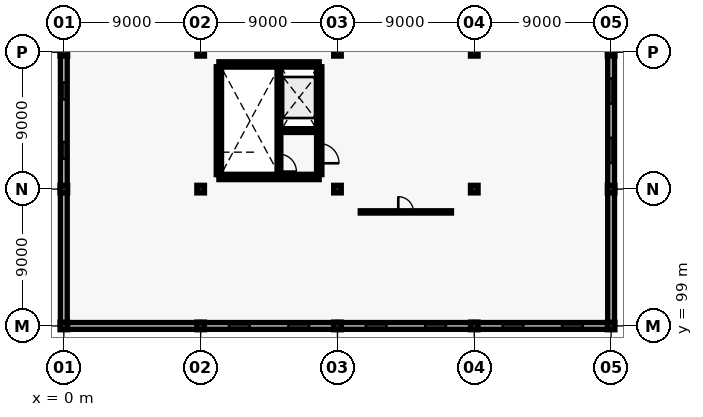
"""IFC4 building model, lengths in metres.
Left out: names, types, materials, properties, quantities, classifications, styles, units other than length and angle.
Written with IfcOpenShell. Run it as: python <this file> out.ifc"""

import sys

from ifc_helpers import new_model, si_unit, direction, frame, frame_2d, origin, origin_2d, place, context, subcontext, project, spatial, rectangle, extrude, element, fill, save


model = new_model("IFC4")
c1 = context("Model", 3, precision=1e-05, world=origin(), true_north=direction((0.0, 1.0)))
c2 = subcontext(c1, "Body", "Model", "MODEL_VIEW")
j1 = project(units=[si_unit("LENGTHUNIT", "METRE"), si_unit("PLANEANGLEUNIT", "RADIAN")], contexts=[c1])
p1 = place(None, origin())
s1 = spatial("IfcSite", under=j1, at=p1, CompositionType="ELEMENT")
p2 = place(p1, origin())
s2 = spatial("IfcBuilding", under=s1, at=p2, CompositionType="ELEMENT")
p3 = place(p2, frame((0.0, 0.0, 9.6)))
s3 = spatial("IfcBuildingStorey", under=s2, at=p3, CompositionType="ELEMENT", Elevation=9.6)
for number, where, z_axis, x_axis in (
    (1, (0.0, 99.0, 0.0), (0.0, 0.0, 1.0), (1.0, 0.0, 0.0)),
    (2, (0.0, 108.0, 0.0), (0.0, 0.0, 1.0), (1.0, 0.0, 0.0)),
    (3, (0.0, 117.0, 0.0), (0.0, 0.0, 1.0), (1.0, 0.0, 0.0)),
    (4, (9.0, 99.0, 0.0), (0.0, 0.0, 1.0), (1.0, 0.0, 0.0)),
    (5, (9.0, 108.0, 0.0), (0.0, 0.0, 1.0), (1.0, 0.0, 0.0)),
    (6, (9.0, 117.0, 0.0), (0.0, 0.0, 1.0), (1.0, 0.0, 0.0)),
    (7, (18.0, 99.0, 0.0), (0.0, 0.0, 1.0), (1.0, 0.0, 0.0)),
    (8, (18.0, 108.0, 0.0), (0.0, 0.0, 1.0), (1.0, 0.0, 0.0)),
    (9, (18.0, 117.0, 0.0), (0.0, 0.0, 1.0), (1.0, 0.0, 0.0)),
    (10, (27.0, 99.0, 0.0), (0.0, 0.0, 1.0), (1.0, 0.0, 0.0)),
    (11, (27.0, 108.0, 0.0), (0.0, 0.0, 1.0), (1.0, 0.0, 0.0)),
    (12, (27.0, 117.0, 0.0), (0.0, 0.0, 1.0), (1.0, 0.0, 0.0)),
    (13, (36.0, 99.0, 0.0), (0.0, 0.0, 1.0), (1.0, 0.0, 0.0)),
    (14, (36.0, 108.0, 0.0), (0.0, 0.0, 1.0), (1.0, 0.0, 0.0)),
    (15, (36.0, 117.0, 0.0), (0.0, 0.0, 1.0), (1.0, 0.0, 0.0)),
):
    element("IfcColumn", number, at=place(p3, frame(where, z_axis=z_axis, x_axis=x_axis)), inside=s3, PredefinedType="COLUMN", context=c2, shape_type="SweptSolid", body=[
        extrude(rectangle(XDim=0.5, YDim=0.5, at=origin_2d()), origin(), (0.0, 0.0, 1.0), 3.9),
    ])
p4 = place(p3, frame((0.0, 99.06, 0.0), z_axis=(0.0, 0.0, 1.0), x_axis=(0.0, 1.0, 0.0)))
e16 = element("IfcWall", 16, at=p4, inside=s3, PredefinedType="SOLIDWALL", context=c2, shape_type="SweptSolid", body=[
    extrude(rectangle(XDim=8.88, YDim=0.45, at=frame_2d((4.44, 0.0))), origin(), (0.0, 0.0, 1.0), 3.15),
])
p5 = place(p3, frame((0.0, 108.06, 0.0), z_axis=(0.0, 0.0, 1.0), x_axis=(0.0, 1.0, 0.0)))
e17 = element("IfcWall", 17, at=p5, inside=s3, PredefinedType="SOLIDWALL", context=c2, shape_type="SweptSolid", body=[
    extrude(rectangle(XDim=8.88, YDim=0.45, at=frame_2d((4.44, 0.0))), origin(), (0.0, 0.0, 1.0), 3.15),
])
p6 = place(p5, frame((1.936, 0.0, 0.9)))
e18 = element("IfcOpeningElement", 18, at=p6, cuts=e17, PredefinedType="OPENING", context=c2, shape_type="SweptSolid", body=[
    extrude(rectangle(XDim=1.1, YDim=1.65, at=frame_2d((0.55, 0.825))), frame((0.0, 0.235, 0.0), z_axis=(0.0, -1.0, 0.0), x_axis=(1.0, 0.0, 0.0)), (0.0, 0.0, 1.0), 0.47),
])
p7 = place(p5, frame((5.844, 0.0, 0.9)))
e19 = element("IfcOpeningElement", 19, at=p7, cuts=e17, PredefinedType="OPENING", context=c2, shape_type="SweptSolid", body=[
    extrude(rectangle(XDim=1.1, YDim=1.65, at=frame_2d((0.55, 0.825))), frame((0.0, 0.235, 0.0), z_axis=(0.0, -1.0, 0.0), x_axis=(1.0, 0.0, 0.0)), (0.0, 0.0, 1.0), 0.47),
])
p8 = place(p3, frame((0.06, 99.0, 0.0), z_axis=(0.0, 0.0, 1.0), x_axis=(1.0, 0.0, 0.0)))
e20 = element("IfcWall", 20, at=p8, inside=s3, PredefinedType="SOLIDWALL", context=c2, shape_type="SweptSolid", body=[
    extrude(rectangle(XDim=8.88, YDim=0.45, at=frame_2d((4.44, 0.0))), origin(), (0.0, 0.0, 1.0), 3.15),
])
p9 = place(p3, frame((9.06, 99.0, 0.0), z_axis=(0.0, 0.0, 1.0), x_axis=(1.0, 0.0, 0.0)))
e21 = element("IfcWall", 21, at=p9, inside=s3, PredefinedType="SOLIDWALL", context=c2, shape_type="SweptSolid", body=[
    extrude(rectangle(XDim=8.88, YDim=0.45, at=frame_2d((4.44, 0.0))), origin(), (0.0, 0.0, 1.0), 3.15),
])
p10 = place(p9, frame((1.811, 0.0, 0.9)))
e22 = element("IfcOpeningElement", 22, at=p10, cuts=e21, PredefinedType="OPENING", context=c2, shape_type="SweptSolid", body=[
    extrude(rectangle(XDim=1.35, YDim=1.5, at=frame_2d((0.675, 0.75))), frame((0.0, 0.235, 0.0), z_axis=(0.0, -1.0, 0.0), x_axis=(1.0, 0.0, 0.0)), (0.0, 0.0, 1.0), 0.47),
])
p11 = place(p9, frame((5.719, 0.0, 0.9)))
e23 = element("IfcOpeningElement", 23, at=p11, cuts=e21, PredefinedType="OPENING", context=c2, shape_type="SweptSolid", body=[
    extrude(rectangle(XDim=1.35, YDim=1.5, at=frame_2d((0.675, 0.75))), frame((0.0, 0.235, 0.0), z_axis=(0.0, -1.0, 0.0), x_axis=(1.0, 0.0, 0.0)), (0.0, 0.0, 1.0), 0.47),
])
p12 = place(p3, frame((18.06, 99.0, 0.0), z_axis=(0.0, 0.0, 1.0), x_axis=(1.0, 0.0, 0.0)))
e24 = element("IfcWall", 24, at=p12, inside=s3, PredefinedType="SOLIDWALL", context=c2, shape_type="SweptSolid", body=[
    extrude(rectangle(XDim=8.88, YDim=0.45, at=frame_2d((4.44, 0.0))), origin(), (0.0, 0.0, 1.0), 3.15),
])
p13 = place(p12, frame((1.811, 0.0, 0.9)))
e25 = element("IfcOpeningElement", 25, at=p13, cuts=e24, PredefinedType="OPENING", context=c2, shape_type="SweptSolid", body=[
    extrude(rectangle(XDim=1.35, YDim=1.5, at=frame_2d((0.675, 0.75))), frame((0.0, 0.235, 0.0), z_axis=(0.0, -1.0, 0.0), x_axis=(1.0, 0.0, 0.0)), (0.0, 0.0, 1.0), 0.47),
])
p14 = place(p12, frame((5.719, 0.0, 0.9)))
e26 = element("IfcOpeningElement", 26, at=p14, cuts=e24, PredefinedType="OPENING", context=c2, shape_type="SweptSolid", body=[
    extrude(rectangle(XDim=1.35, YDim=1.5, at=frame_2d((0.675, 0.75))), frame((0.0, 0.235, 0.0), z_axis=(0.0, -1.0, 0.0), x_axis=(1.0, 0.0, 0.0)), (0.0, 0.0, 1.0), 0.47),
])
p15 = place(p3, frame((27.06, 99.0, 0.0), z_axis=(0.0, 0.0, 1.0), x_axis=(1.0, 0.0, 0.0)))
e27 = element("IfcWall", 27, at=p15, inside=s3, PredefinedType="SOLIDWALL", context=c2, shape_type="SweptSolid", body=[
    extrude(rectangle(XDim=8.88, YDim=0.45, at=frame_2d((4.44, 0.0))), origin(), (0.0, 0.0, 1.0), 3.15),
])
p16 = place(p15, frame((1.811, 0.0, 0.9)))
e28 = element("IfcOpeningElement", 28, at=p16, cuts=e27, PredefinedType="OPENING", context=c2, shape_type="SweptSolid", body=[
    extrude(rectangle(XDim=1.35, YDim=1.5, at=frame_2d((0.675, 0.75))), frame((0.0, 0.235, 0.0), z_axis=(0.0, -1.0, 0.0), x_axis=(1.0, 0.0, 0.0)), (0.0, 0.0, 1.0), 0.47),
])
p17 = place(p15, frame((5.719, 0.0, 0.9)))
e29 = element("IfcOpeningElement", 29, at=p17, cuts=e27, PredefinedType="OPENING", context=c2, shape_type="SweptSolid", body=[
    extrude(rectangle(XDim=1.35, YDim=1.5, at=frame_2d((0.675, 0.75))), frame((0.0, 0.235, 0.0), z_axis=(0.0, -1.0, 0.0), x_axis=(1.0, 0.0, 0.0)), (0.0, 0.0, 1.0), 0.47),
])
p18 = place(p3, frame((36.0, 99.06, 0.0), z_axis=(0.0, 0.0, 1.0), x_axis=(0.0, 1.0, 0.0)))
e30 = element("IfcWall", 30, at=p18, inside=s3, PredefinedType="SOLIDWALL", context=c2, shape_type="SweptSolid", body=[
    extrude(rectangle(XDim=8.88, YDim=0.45, at=frame_2d((4.44, 0.0))), origin(), (0.0, 0.0, 1.0), 3.15),
])
p19 = place(p3, frame((36.0, 108.06, 0.0), z_axis=(0.0, 0.0, 1.0), x_axis=(0.0, 1.0, 0.0)))
e31 = element("IfcWall", 31, at=p19, inside=s3, PredefinedType="SOLIDWALL", context=c2, shape_type="SweptSolid", body=[
    extrude(rectangle(XDim=8.88, YDim=0.45, at=frame_2d((4.44, 0.0))), origin(), (0.0, 0.0, 1.0), 3.15),
])
p20 = place(p19, frame((1.661, 0.0, 0.9)))
e32 = element("IfcOpeningElement", 32, at=p20, cuts=e31, PredefinedType="OPENING", context=c2, shape_type="SweptSolid", body=[
    extrude(rectangle(XDim=1.65, YDim=1.5, at=frame_2d((0.825, 0.75))), frame((0.0, 0.235, 0.0), z_axis=(0.0, -1.0, 0.0), x_axis=(1.0, 0.0, 0.0)), (0.0, 0.0, 1.0), 0.47),
])
p21 = place(p19, frame((5.569, 0.0, 0.9)))
e33 = element("IfcOpeningElement", 33, at=p21, cuts=e31, PredefinedType="OPENING", context=c2, shape_type="SweptSolid", body=[
    extrude(rectangle(XDim=1.65, YDim=1.5, at=frame_2d((0.825, 0.75))), frame((0.0, 0.235, 0.0), z_axis=(0.0, -1.0, 0.0), x_axis=(1.0, 0.0, 0.0)), (0.0, 0.0, 1.0), 0.47),
])
for number, where, z_axis, x_axis in (
    (34, (10.2, 108.8, 0.0), (0.0, 0.0, 1.0), (1.0, 0.0, 0.0)),
    (35, (10.2, 116.2, 0.0), (0.0, 0.0, 1.0), (1.0, 0.0, 0.0)),
):
    element("IfcWall", number, at=place(p3, frame(where, z_axis=z_axis, x_axis=x_axis)), inside=s3, PredefinedType="SHEAR", context=c2, shape_type="SweptSolid", body=[
        extrude(rectangle(XDim=6.6, YDim=0.35, at=frame_2d((3.3, 0.0))), origin(), (0.0, 0.0, 1.0), 3.7),
    ])
p22 = place(p3, frame((10.2, 108.95, 0.0), z_axis=(0.0, 0.0, 1.0), x_axis=(0.0, 1.0, 0.0)))
e36 = element("IfcWall", 36, at=p22, inside=s3, PredefinedType="SHEAR", context=c2, shape_type="SweptSolid", body=[
    extrude(rectangle(XDim=7.1, YDim=0.35, at=frame_2d((3.55, 0.0))), origin(), (0.0, 0.0, 1.0), 3.7),
])
p23 = place(p3, frame((16.8, 108.95, 0.0), z_axis=(0.0, 0.0, 1.0), x_axis=(0.0, 1.0, 0.0)))
e37 = element("IfcWall", 37, at=p23, inside=s3, PredefinedType="SHEAR", context=c2, shape_type="SweptSolid", body=[
    extrude(rectangle(XDim=7.1, YDim=0.35, at=frame_2d((3.55, 0.0))), origin(), (0.0, 0.0, 1.0), 3.7),
])
p24 = place(p23, frame((0.75, 0.0, 0.0)))
e38 = element("IfcOpeningElement", 38, at=p24, cuts=e37, PredefinedType="OPENING", context=c2, shape_type="SweptSolid", body=[
    extrude(rectangle(XDim=1.3, YDim=2.15, at=frame_2d((0.65, 1.075))), frame((0.0, 0.185, 0.0), z_axis=(0.0, -1.0, 0.0), x_axis=(1.0, 0.0, 0.0)), (0.0, 0.0, 1.0), 0.37),
])
p25 = place(p3, frame((14.15, 108.95, 0.0), z_axis=(0.0, 0.0, 1.0), x_axis=(0.0, 1.0, 0.0)))
e39 = element("IfcWall", 39, at=p25, inside=s3, PredefinedType="SHEAR", context=c2, shape_type="SweptSolid", body=[
    extrude(rectangle(XDim=7.1, YDim=0.25, at=frame_2d((3.55, 0.0))), origin(), (0.0, 0.0, 1.0), 3.7),
])
p26 = place(p25, frame((0.2, 0.0, 0.0)))
e40 = element("IfcOpeningElement", 40, at=p26, cuts=e39, PredefinedType="OPENING", context=c2, shape_type="SweptSolid", body=[
    extrude(rectangle(XDim=1.15, YDim=2.15, at=frame_2d((0.575, 1.075))), frame((0.0, 0.135, 0.0), z_axis=(0.0, -1.0, 0.0), x_axis=(1.0, 0.0, 0.0)), (0.0, 0.0, 1.0), 0.27),
])
p27 = place(p3, frame((14.27, 111.85, 0.0), z_axis=(0.0, 0.0, 1.0), x_axis=(1.0, 0.0, 0.0)))
e41 = element("IfcWall", 41, at=p27, inside=s3, PredefinedType="SHEAR", context=c2, shape_type="SweptSolid", body=[
    extrude(rectangle(XDim=2.38, YDim=0.25, at=frame_2d((1.19, 0.0))), origin(), (0.0, 0.0, 1.0), 3.7),
])
p28 = place(p27, frame((0.39, 0.0, 0.0)))
e42 = element("IfcOpeningElement", 42, at=p28, cuts=e41, PredefinedType="OPENING", context=c2, shape_type="SweptSolid", body=[
    extrude(rectangle(XDim=1.6, YDim=2.3, at=frame_2d((0.8, 1.15))), frame((0.0, 0.135, 0.0), z_axis=(0.0, -1.0, 0.0), x_axis=(1.0, 0.0, 0.0)), (0.0, 0.0, 1.0), 0.27),
])
p29 = place(p3, frame((19.5, 106.5, 0.0), z_axis=(0.0, 0.0, 1.0), x_axis=(1.0, 0.0, 0.0)))
e43 = element("IfcWall", 43, at=p29, inside=s3, PredefinedType="PARTITIONING", context=c2, shape_type="SweptSolid", body=[
    extrude(rectangle(XDim=6.0, YDim=0.15, at=frame_2d((3.0, 0.0))), origin(), (0.0, 0.0, 1.0), 2.9),
])
p30 = place(p29, frame((2.5, 0.0, 0.0)))
e44 = element("IfcOpeningElement", 44, at=p30, cuts=e43, PredefinedType="OPENING", context=c2, shape_type="SweptSolid", body=[
    extrude(rectangle(XDim=1.0, YDim=2.1, at=frame_2d((0.5, 1.05))), frame((0.0, 0.085, 0.0), z_axis=(0.0, -1.0, 0.0), x_axis=(1.0, 0.0, 0.0)), (0.0, 0.0, 1.0), 0.17),
])
p31 = place(p6, origin())
e45 = element("IfcWindow", 45, at=p31, inside=s3, PartitioningType="SINGLE_PANEL", PredefinedType="WINDOW", context=c2, shape_type="SweptSolid", body=[
    extrude(rectangle(XDim=1.1, YDim=1.65, at=frame_2d((0.55, 0.825))), frame((0.0, 0.03, 0.0), z_axis=(0.0, -1.0, 0.0), x_axis=(1.0, 0.0, 0.0)), (0.0, 0.0, 1.0), 0.06),
])
fill(e18, e45)
p32 = place(p7, origin())
e46 = element("IfcWindow", 46, at=p32, inside=s3, PartitioningType="SINGLE_PANEL", PredefinedType="WINDOW", context=c2, shape_type="SweptSolid", body=[
    extrude(rectangle(XDim=1.1, YDim=1.65, at=frame_2d((0.55, 0.825))), frame((0.0, 0.03, 0.0), z_axis=(0.0, -1.0, 0.0), x_axis=(1.0, 0.0, 0.0)), (0.0, 0.0, 1.0), 0.06),
])
fill(e19, e46)
p33 = place(p10, origin())
e47 = element("IfcWindow", 47, at=p33, inside=s3, PartitioningType="SINGLE_PANEL", PredefinedType="WINDOW", context=c2, shape_type="SweptSolid", body=[
    extrude(rectangle(XDim=1.35, YDim=1.5, at=frame_2d((0.675, 0.75))), frame((0.0, 0.03, 0.0), z_axis=(0.0, -1.0, 0.0), x_axis=(1.0, 0.0, 0.0)), (0.0, 0.0, 1.0), 0.06),
])
fill(e22, e47)
p34 = place(p11, origin())
e48 = element("IfcWindow", 48, at=p34, inside=s3, PartitioningType="SINGLE_PANEL", PredefinedType="WINDOW", context=c2, shape_type="SweptSolid", body=[
    extrude(rectangle(XDim=1.35, YDim=1.5, at=frame_2d((0.675, 0.75))), frame((0.0, 0.03, 0.0), z_axis=(0.0, -1.0, 0.0), x_axis=(1.0, 0.0, 0.0)), (0.0, 0.0, 1.0), 0.06),
])
fill(e23, e48)
p35 = place(p13, origin())
e49 = element("IfcWindow", 49, at=p35, inside=s3, PartitioningType="SINGLE_PANEL", PredefinedType="WINDOW", context=c2, shape_type="SweptSolid", body=[
    extrude(rectangle(XDim=1.35, YDim=1.5, at=frame_2d((0.675, 0.75))), frame((0.0, 0.03, 0.0), z_axis=(0.0, -1.0, 0.0), x_axis=(1.0, 0.0, 0.0)), (0.0, 0.0, 1.0), 0.06),
])
fill(e25, e49)
p36 = place(p14, origin())
e50 = element("IfcWindow", 50, at=p36, inside=s3, PartitioningType="SINGLE_PANEL", PredefinedType="WINDOW", context=c2, shape_type="SweptSolid", body=[
    extrude(rectangle(XDim=1.35, YDim=1.5, at=frame_2d((0.675, 0.75))), frame((0.0, 0.03, 0.0), z_axis=(0.0, -1.0, 0.0), x_axis=(1.0, 0.0, 0.0)), (0.0, 0.0, 1.0), 0.06),
])
fill(e26, e50)
p37 = place(p16, origin())
e51 = element("IfcWindow", 51, at=p37, inside=s3, PartitioningType="SINGLE_PANEL", PredefinedType="WINDOW", context=c2, shape_type="SweptSolid", body=[
    extrude(rectangle(XDim=1.35, YDim=1.5, at=frame_2d((0.675, 0.75))), frame((0.0, 0.03, 0.0), z_axis=(0.0, -1.0, 0.0), x_axis=(1.0, 0.0, 0.0)), (0.0, 0.0, 1.0), 0.06),
])
fill(e28, e51)
p38 = place(p17, origin())
e52 = element("IfcWindow", 52, at=p38, inside=s3, PartitioningType="SINGLE_PANEL", PredefinedType="WINDOW", context=c2, shape_type="SweptSolid", body=[
    extrude(rectangle(XDim=1.35, YDim=1.5, at=frame_2d((0.675, 0.75))), frame((0.0, 0.03, 0.0), z_axis=(0.0, -1.0, 0.0), x_axis=(1.0, 0.0, 0.0)), (0.0, 0.0, 1.0), 0.06),
])
fill(e29, e52)
p39 = place(p20, origin())
e53 = element("IfcWindow", 53, at=p39, inside=s3, PartitioningType="SINGLE_PANEL", PredefinedType="WINDOW", context=c2, shape_type="SweptSolid", body=[
    extrude(rectangle(XDim=1.65, YDim=1.5, at=frame_2d((0.825, 0.75))), frame((0.0, 0.03, 0.0), z_axis=(0.0, -1.0, 0.0), x_axis=(1.0, 0.0, 0.0)), (0.0, 0.0, 1.0), 0.06),
])
fill(e32, e53)
p40 = place(p21, origin())
e54 = element("IfcWindow", 54, at=p40, inside=s3, PartitioningType="SINGLE_PANEL", PredefinedType="WINDOW", context=c2, shape_type="SweptSolid", body=[
    extrude(rectangle(XDim=1.65, YDim=1.5, at=frame_2d((0.825, 0.75))), frame((0.0, 0.03, 0.0), z_axis=(0.0, -1.0, 0.0), x_axis=(1.0, 0.0, 0.0)), (0.0, 0.0, 1.0), 0.06),
])
fill(e33, e54)
p41 = place(p24, frame((1.3, 0.0, 0.0), z_axis=(0.0, 0.0, 1.0), x_axis=(-1.0, 0.0, 0.0)))
e55 = element("IfcDoor", 55, at=p41, inside=s3, OperationType="DOUBLE_DOOR_SINGLE_SWING", PredefinedType="DOOR", context=c2, shape_type="SweptSolid", body=[
    extrude(rectangle(XDim=1.3, YDim=2.15, at=frame_2d((0.65, 1.075))), frame((0.0, 0.025, 0.0), z_axis=(0.0, -1.0, 0.0), x_axis=(1.0, 0.0, 0.0)), (0.0, 0.0, 1.0), 0.05),
])
fill(e38, e55)
p42 = place(p26, frame((1.15, 0.0, 0.0), z_axis=(0.0, 0.0, 1.0), x_axis=(-1.0, 0.0, 0.0)))
e56 = element("IfcDoor", 56, at=p42, inside=s3, OperationType="SINGLE_SWING_LEFT", PredefinedType="DOOR", context=c2, shape_type="SweptSolid", body=[
    extrude(rectangle(XDim=1.15, YDim=2.15, at=frame_2d((0.575, 1.075))), frame((0.0, 0.025, 0.0), z_axis=(0.0, -1.0, 0.0), x_axis=(1.0, 0.0, 0.0)), (0.0, 0.0, 1.0), 0.05),
])
fill(e40, e56)
p43 = place(p28, origin())
e57 = element("IfcDoor", 57, at=p43, inside=s3, OperationType="SLIDING_TO_LEFT", PredefinedType="DOOR", context=c2, shape_type="SweptSolid", body=[
    extrude(rectangle(XDim=1.6, YDim=2.3, at=frame_2d((0.8, 1.15))), frame((0.0, 0.025, 0.0), z_axis=(0.0, -1.0, 0.0), x_axis=(1.0, 0.0, 0.0)), (0.0, 0.0, 1.0), 0.05),
])
fill(e42, e57)
p44 = place(p30, origin())
e58 = element("IfcDoor", 58, at=p44, inside=s3, OperationType="SINGLE_SWING_LEFT", PredefinedType="DOOR", context=c2, shape_type="SweptSolid", body=[
    extrude(rectangle(XDim=1.0, YDim=2.1, at=frame_2d((0.5, 1.05))), frame((0.0, 0.025, 0.0), z_axis=(0.0, -1.0, 0.0), x_axis=(1.0, 0.0, 0.0)), (0.0, 0.0, 1.0), 0.05),
])
fill(e44, e58)
save(model, sys.argv[1])
